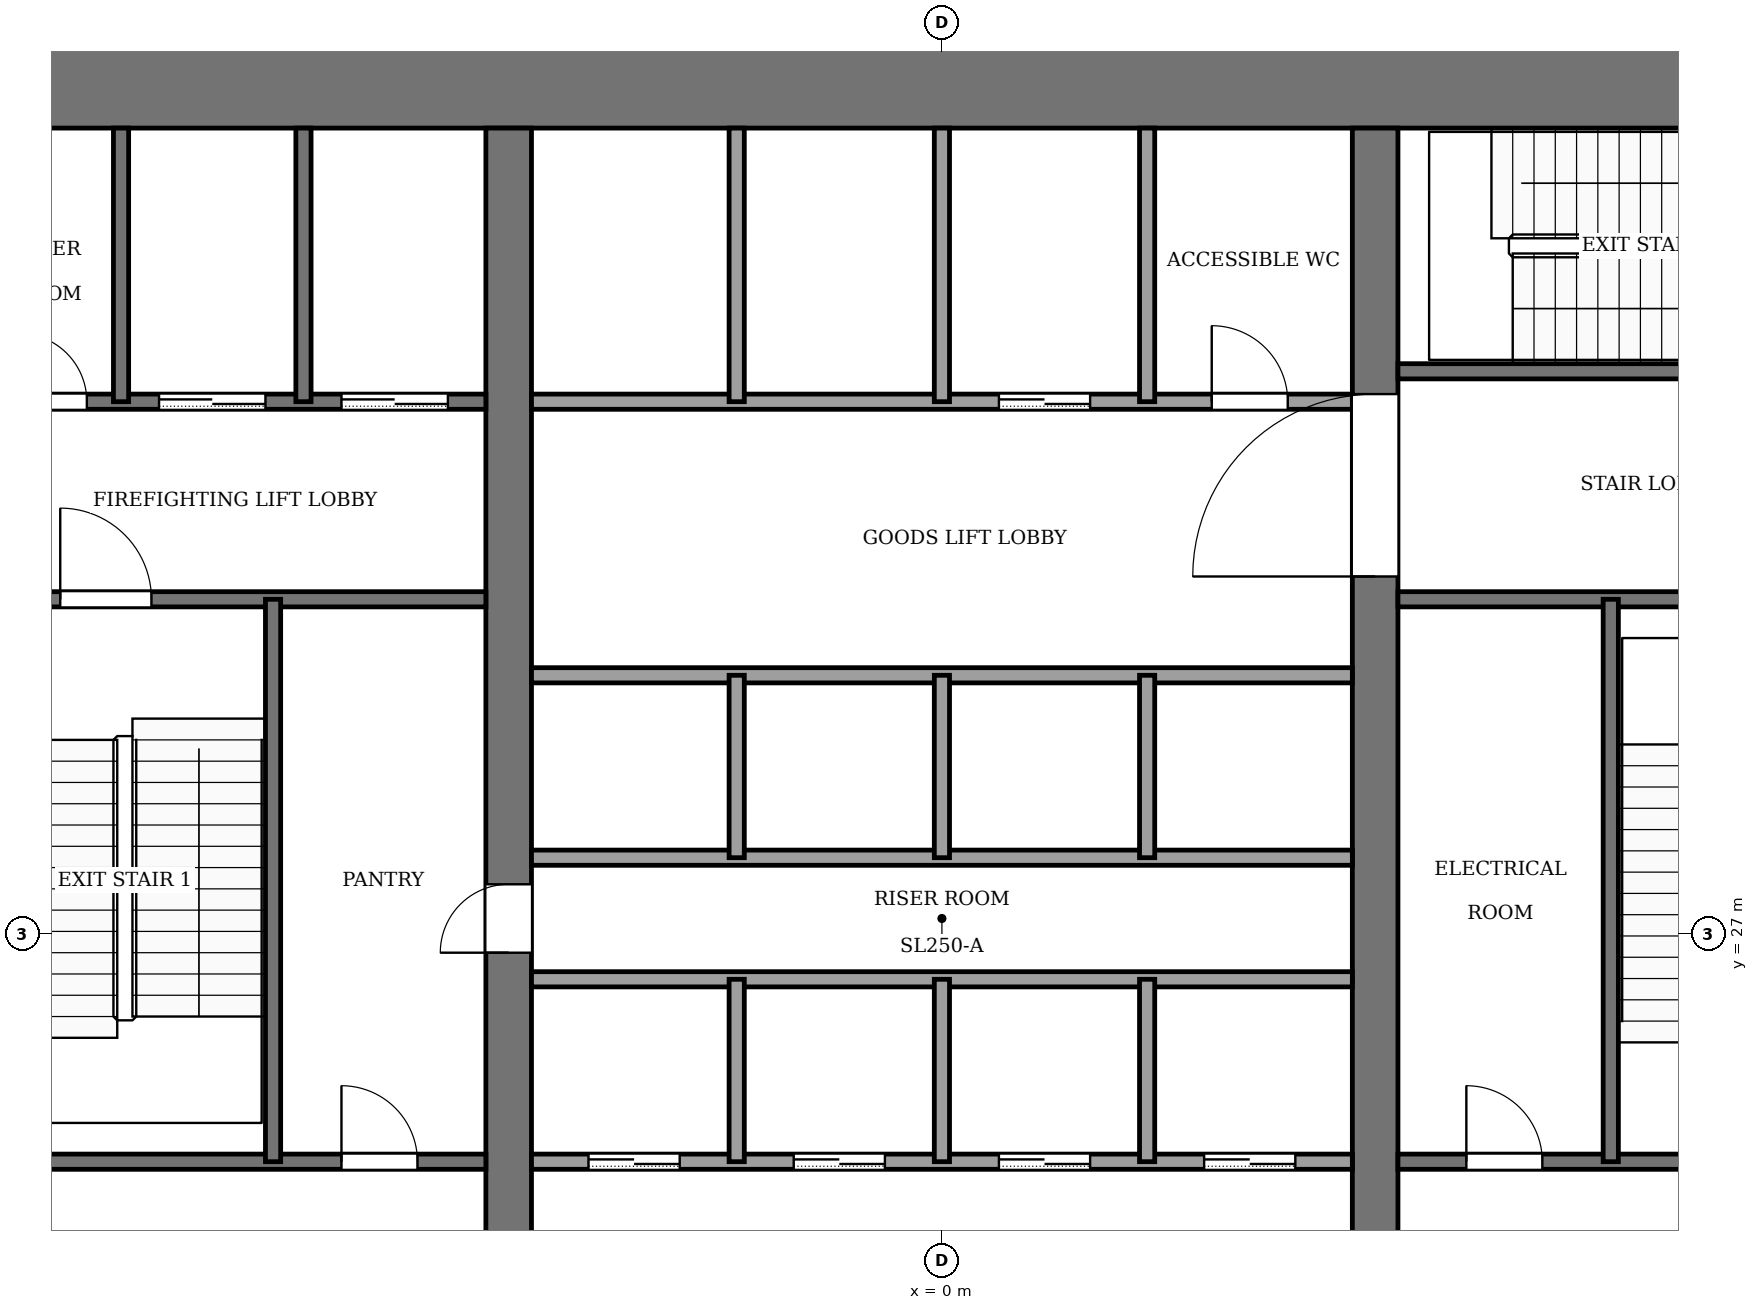
"""IFC4 building model, lengths in metres.
Left out: names, types, materials, properties, quantities, classifications, styles, units other than length and angle.
Written with IfcOpenShell. Run it as: python <this file> out.ifc"""

import sys

from ifc_helpers import new_model, si_unit, direction, frame, frame_2d, origin, place, context, subcontext, project, spatial, rectangle, extrude, element, fill, save


model = new_model("IFC4")
c1 = context("Model", 3, precision=1e-05, world=origin(), true_north=direction((0.0, 1.0)))
c2 = subcontext(c1, "Body", "Model", "MODEL_VIEW")
j1 = project(units=[si_unit("LENGTHUNIT", "METRE"), si_unit("PLANEANGLEUNIT", "RADIAN")], contexts=[c1])
p1 = place(None, origin())
s1 = spatial("IfcSite", under=j1, at=p1, CompositionType="ELEMENT")
p2 = place(p1, origin())
s2 = spatial("IfcBuilding", under=s1, at=p2, CompositionType="ELEMENT")
p3 = place(p2, frame((0.0, 0.0, 9.0)))
s3 = spatial("IfcBuildingStorey", under=s2, at=p3, CompositionType="ELEMENT", Elevation=9.0)
p4 = place(p3, frame((-14.0, 38.3, -0.13), z_axis=(0.0, 0.0, 1.0), x_axis=(1.0, 0.0, 0.0)))
e1 = element("IfcWall", 1, at=p4, inside=s3, PredefinedType="SHEAR", context=c2, shape_type="SweptSolid", body=[
    extrude(rectangle(XDim=28.0, YDim=1.4, at=frame_2d((14.0, 0.0))), origin(), (0.0, 0.0, 1.0), 5.0),
])
p5 = place(p3, frame((-5.7, 18.4, -0.13), z_axis=(0.0, 0.0, 1.0), x_axis=(0.0, 1.0, 0.0)))
e2 = element("IfcWall", 2, at=p5, inside=s3, PredefinedType="SHEAR", context=c2, shape_type="SweptSolid", body=[
    extrude(rectangle(XDim=19.2, YDim=0.6, at=frame_2d((9.6, 0.0))), origin(), (0.0, 0.0, 1.0), 5.0),
])
p6 = place(p5, frame((8.35, 0.0, 0.13)))
e3 = element("IfcOpeningElement", 3, at=p6, cuts=e2, PredefinedType="OPENING", context=c2, shape_type="SweptSolid", body=[
    extrude(rectangle(XDim=0.9, YDim=2.1, at=frame_2d((0.45, 1.05))), frame((0.0, 0.31, 0.0), z_axis=(0.0, -1.0, 0.0), x_axis=(1.0, 0.0, 0.0)), (0.0, 0.0, 1.0), 0.62),
])
p7 = place(p3, frame((5.7, 18.4, -0.13), z_axis=(0.0, 0.0, 1.0), x_axis=(0.0, 1.0, 0.0)))
e4 = element("IfcWall", 4, at=p7, inside=s3, PredefinedType="SHEAR", context=c2, shape_type="SweptSolid", body=[
    extrude(rectangle(XDim=19.2, YDim=0.6, at=frame_2d((9.6, 0.0))), origin(), (0.0, 0.0, 1.0), 5.0),
])
p8 = place(p7, frame((13.3, 0.0, 0.13)))
e5 = element("IfcOpeningElement", 5, at=p8, cuts=e4, PredefinedType="OPENING", context=c2, shape_type="SweptSolid", body=[
    extrude(rectangle(XDim=2.4, YDim=2.4, at=frame_2d((1.2, 1.2))), frame((0.0, 0.31, 0.0), z_axis=(0.0, -1.0, 0.0), x_axis=(1.0, 0.0, 0.0)), (0.0, 0.0, 1.0), 0.62),
])
p9 = place(p3, frame((-12.6, 24.0, 0.0), z_axis=(0.0, 0.0, 1.0), x_axis=(1.0, 0.0, 0.0)))
e6 = element("IfcWall", 6, at=p9, inside=s3, PredefinedType="PARTITIONING", context=c2, shape_type="SweptSolid", body=[
    extrude(rectangle(XDim=6.6, YDim=0.2, at=frame_2d((3.3, 0.0))), origin(), (0.0, 0.0, 1.0), 4.87),
])
p10 = place(p9, frame((4.7, 0.0, 0.0)))
e7 = element("IfcOpeningElement", 7, at=p10, cuts=e6, PredefinedType="OPENING", context=c2, shape_type="SweptSolid", body=[
    extrude(rectangle(XDim=1.0, YDim=2.1, at=frame_2d((0.5, 1.05))), frame((0.0, 0.11, 0.0), z_axis=(0.0, -1.0, 0.0), x_axis=(1.0, 0.0, 0.0)), (0.0, 0.0, 1.0), 0.22),
])
p11 = place(p3, frame((-5.4, 24.0, 0.0), z_axis=(0.0, 0.0, 1.0), x_axis=(1.0, 0.0, 0.0)))
e8 = element("IfcWall", 8, at=p11, inside=s3, PredefinedType="PARTITIONING", context=c2, shape_type="SweptSolid", body=[
    extrude(rectangle(XDim=10.8, YDim=0.2, at=frame_2d((5.4, 0.0))), origin(), (0.0, 0.0, 1.0), 4.87),
])
p12 = place(p11, frame((0.75, 0.0, 0.0)))
e9 = element("IfcOpeningElement", 9, at=p12, cuts=e8, PredefinedType="OPENING", context=c2, shape_type="SweptSolid", body=[
    extrude(rectangle(XDim=1.2, YDim=2.2, at=frame_2d((0.6, 1.1))), frame((0.0, 0.11, 0.0), z_axis=(0.0, -1.0, 0.0), x_axis=(1.0, 0.0, 0.0)), (0.0, 0.0, 1.0), 0.22),
])
p13 = place(p11, frame((3.45, 0.0, 0.0)))
e10 = element("IfcOpeningElement", 10, at=p13, cuts=e8, PredefinedType="OPENING", context=c2, shape_type="SweptSolid", body=[
    extrude(rectangle(XDim=1.2, YDim=2.2, at=frame_2d((0.6, 1.1))), frame((0.0, 0.11, 0.0), z_axis=(0.0, -1.0, 0.0), x_axis=(1.0, 0.0, 0.0)), (0.0, 0.0, 1.0), 0.22),
])
p14 = place(p11, frame((6.15, 0.0, 0.0)))
e11 = element("IfcOpeningElement", 11, at=p14, cuts=e8, PredefinedType="OPENING", context=c2, shape_type="SweptSolid", body=[
    extrude(rectangle(XDim=1.2, YDim=2.2, at=frame_2d((0.6, 1.1))), frame((0.0, 0.11, 0.0), z_axis=(0.0, -1.0, 0.0), x_axis=(1.0, 0.0, 0.0)), (0.0, 0.0, 1.0), 0.22),
])
p15 = place(p11, frame((8.85, 0.0, 0.0)))
e12 = element("IfcOpeningElement", 12, at=p15, cuts=e8, PredefinedType="OPENING", context=c2, shape_type="SweptSolid", body=[
    extrude(rectangle(XDim=1.2, YDim=2.2, at=frame_2d((0.6, 1.1))), frame((0.0, 0.11, 0.0), z_axis=(0.0, -1.0, 0.0), x_axis=(1.0, 0.0, 0.0)), (0.0, 0.0, 1.0), 0.22),
])
p16 = place(p3, frame((6.0, 24.0, 0.0), z_axis=(0.0, 0.0, 1.0), x_axis=(1.0, 0.0, 0.0)))
e13 = element("IfcWall", 13, at=p16, inside=s3, PredefinedType="PARTITIONING", context=c2, shape_type="SweptSolid", body=[
    extrude(rectangle(XDim=6.6, YDim=0.2, at=frame_2d((3.3, 0.0))), origin(), (0.0, 0.0, 1.0), 4.87),
])
p17 = place(p16, frame((0.9, 0.0, 0.0)))
e14 = element("IfcOpeningElement", 14, at=p17, cuts=e13, PredefinedType="OPENING", context=c2, shape_type="SweptSolid", body=[
    extrude(rectangle(XDim=1.0, YDim=2.1, at=frame_2d((0.5, 1.05))), frame((0.0, 0.11, 0.0), z_axis=(0.0, -1.0, 0.0), x_axis=(1.0, 0.0, 0.0)), (0.0, 0.0, 1.0), 0.22),
])
p18 = place(p16, frame((4.4, 0.0, 0.0)))
e15 = element("IfcOpeningElement", 15, at=p18, cuts=e13, PredefinedType="OPENING", context=c2, shape_type="SweptSolid", body=[
    extrude(rectangle(XDim=1.2, YDim=2.2, at=frame_2d((0.6, 1.1))), frame((0.0, 0.11, 0.0), z_axis=(0.0, -1.0, 0.0), x_axis=(1.0, 0.0, 0.0)), (0.0, 0.0, 1.0), 0.22),
])
for number, where, z_axis, x_axis in (
    (16, (-5.4, 26.4, 0.0), (0.0, 0.0, 1.0), (1.0, 0.0, 0.0)),
    (17, (-5.4, 28.0, 0.0), (0.0, 0.0, 1.0), (1.0, 0.0, 0.0)),
    (18, (-5.4, 30.4, 0.0), (0.0, 0.0, 1.0), (1.0, 0.0, 0.0)),
):
    element("IfcWall", number, at=place(p3, frame(where, z_axis=z_axis, x_axis=x_axis)), inside=s3, PredefinedType="PARTITIONING", context=c2, shape_type="SweptSolid", body=[
        extrude(rectangle(XDim=10.8, YDim=0.2, at=frame_2d((5.4, 0.0))), origin(), (0.0, 0.0, 1.0), 4.87),
    ])
p19 = place(p3, frame((-12.6, 31.4, 0.0), z_axis=(0.0, 0.0, 1.0), x_axis=(1.0, 0.0, 0.0)))
e19 = element("IfcWall", 19, at=p19, inside=s3, PredefinedType="PARTITIONING", context=c2, shape_type="SweptSolid", body=[
    extrude(rectangle(XDim=6.6, YDim=0.2, at=frame_2d((3.3, 0.0))), origin(), (0.0, 0.0, 1.0), 4.87),
])
p20 = place(p19, frame((1.0, 0.0, 0.0)))
e20 = element("IfcOpeningElement", 20, at=p20, cuts=e19, PredefinedType="OPENING", context=c2, shape_type="SweptSolid", body=[
    extrude(rectangle(XDim=1.2, YDim=2.2, at=frame_2d((0.6, 1.1))), frame((0.0, 0.11, 0.0), z_axis=(0.0, -1.0, 0.0), x_axis=(1.0, 0.0, 0.0)), (0.0, 0.0, 1.0), 0.22),
])
p21 = place(p3, frame((6.0, 31.4, 0.0), z_axis=(0.0, 0.0, 1.0), x_axis=(1.0, 0.0, 0.0)))
e21 = element("IfcWall", 21, at=p21, inside=s3, PredefinedType="PARTITIONING", context=c2, shape_type="SweptSolid", body=[
    extrude(rectangle(XDim=6.6, YDim=0.2, at=frame_2d((3.3, 0.0))), origin(), (0.0, 0.0, 1.0), 4.87),
])
p22 = place(p3, frame((-12.6, 34.0, 0.0), z_axis=(0.0, 0.0, 1.0), x_axis=(1.0, 0.0, 0.0)))
e22 = element("IfcWall", 22, at=p22, inside=s3, PredefinedType="PARTITIONING", context=c2, shape_type="SweptSolid", body=[
    extrude(rectangle(XDim=6.6, YDim=0.2, at=frame_2d((3.3, 0.0))), origin(), (0.0, 0.0, 1.0), 4.87),
])
p23 = place(p22, frame((4.7, 0.0, 0.0)))
e23 = element("IfcOpeningElement", 23, at=p23, cuts=e22, PredefinedType="OPENING", context=c2, shape_type="SweptSolid", body=[
    extrude(rectangle(XDim=1.4, YDim=2.2, at=frame_2d((0.7, 1.1))), frame((0.0, 0.11, 0.0), z_axis=(0.0, -1.0, 0.0), x_axis=(1.0, 0.0, 0.0)), (0.0, 0.0, 1.0), 0.22),
])
p24 = place(p22, frame((2.3, 0.0, 0.0)))
e24 = element("IfcOpeningElement", 24, at=p24, cuts=e22, PredefinedType="OPENING", context=c2, shape_type="SweptSolid", body=[
    extrude(rectangle(XDim=1.4, YDim=2.2, at=frame_2d((0.7, 1.1))), frame((0.0, 0.11, 0.0), z_axis=(0.0, -1.0, 0.0), x_axis=(1.0, 0.0, 0.0)), (0.0, 0.0, 1.0), 0.22),
])
p25 = place(p22, frame((0.45, 0.0, 0.0)))
e25 = element("IfcOpeningElement", 25, at=p25, cuts=e22, PredefinedType="OPENING", context=c2, shape_type="SweptSolid", body=[
    extrude(rectangle(XDim=0.9, YDim=2.1, at=frame_2d((0.45, 1.05))), frame((0.0, 0.11, 0.0), z_axis=(0.0, -1.0, 0.0), x_axis=(1.0, 0.0, 0.0)), (0.0, 0.0, 1.0), 0.22),
])
p26 = place(p3, frame((-5.4, 34.0, 0.0), z_axis=(0.0, 0.0, 1.0), x_axis=(1.0, 0.0, 0.0)))
e26 = element("IfcWall", 26, at=p26, inside=s3, PredefinedType="PARTITIONING", context=c2, shape_type="SweptSolid", body=[
    extrude(rectangle(XDim=10.8, YDim=0.2, at=frame_2d((5.4, 0.0))), origin(), (0.0, 0.0, 1.0), 4.87),
])
p27 = place(p26, frame((6.15, 0.0, 0.0)))
e27 = element("IfcOpeningElement", 27, at=p27, cuts=e26, PredefinedType="OPENING", context=c2, shape_type="SweptSolid", body=[
    extrude(rectangle(XDim=1.2, YDim=2.2, at=frame_2d((0.6, 1.1))), frame((0.0, 0.11, 0.0), z_axis=(0.0, -1.0, 0.0), x_axis=(1.0, 0.0, 0.0)), (0.0, 0.0, 1.0), 0.22),
])
p28 = place(p26, frame((8.95, 0.0, 0.0)))
e28 = element("IfcOpeningElement", 28, at=p28, cuts=e26, PredefinedType="OPENING", context=c2, shape_type="SweptSolid", body=[
    extrude(rectangle(XDim=1.0, YDim=2.1, at=frame_2d((0.5, 1.05))), frame((0.0, 0.11, 0.0), z_axis=(0.0, -1.0, 0.0), x_axis=(1.0, 0.0, 0.0)), (0.0, 0.0, 1.0), 0.22),
])
p29 = place(p3, frame((6.0, 34.4, 0.0), z_axis=(0.0, 0.0, 1.0), x_axis=(1.0, 0.0, 0.0)))
e29 = element("IfcWall", 29, at=p29, inside=s3, PredefinedType="PARTITIONING", context=c2, shape_type="SweptSolid", body=[
    extrude(rectangle(XDim=6.6, YDim=0.2, at=frame_2d((3.3, 0.0))), origin(), (0.0, 0.0, 1.0), 4.87),
])
p30 = place(p29, frame((4.8, 0.0, 0.0)))
e30 = element("IfcOpeningElement", 30, at=p30, cuts=e29, PredefinedType="OPENING", context=c2, shape_type="SweptSolid", body=[
    extrude(rectangle(XDim=1.2, YDim=2.2, at=frame_2d((0.6, 1.1))), frame((0.0, 0.11, 0.0), z_axis=(0.0, -1.0, 0.0), x_axis=(1.0, 0.0, 0.0)), (0.0, 0.0, 1.0), 0.22),
])
p31 = place(p3, frame((-10.8, 34.0, 0.0), z_axis=(0.0, 0.0, 1.0), x_axis=(0.0, 1.0, 0.0)))
e31 = element("IfcWall", 31, at=p31, inside=s3, PredefinedType="PARTITIONING", context=c2, shape_type="SweptSolid", body=[
    extrude(rectangle(XDim=3.6, YDim=0.2, at=frame_2d((1.8, 0.0))), origin(), (0.0, 0.0, 1.0), 4.87),
])
p32 = place(p3, frame((-8.8, 24.0, 0.0), z_axis=(0.0, 0.0, 1.0), x_axis=(0.0, 1.0, 0.0)))
e32 = element("IfcWall", 32, at=p32, inside=s3, PredefinedType="PARTITIONING", context=c2, shape_type="SweptSolid", body=[
    extrude(rectangle(XDim=7.4, YDim=0.2, at=frame_2d((3.7, 0.0))), origin(), (0.0, 0.0, 1.0), 4.87),
])
p33 = place(p3, frame((-8.4, 34.0, 0.0), z_axis=(0.0, 0.0, 1.0), x_axis=(0.0, 1.0, 0.0)))
e33 = element("IfcWall", 33, at=p33, inside=s3, PredefinedType="PARTITIONING", context=c2, shape_type="SweptSolid", body=[
    extrude(rectangle(XDim=3.6, YDim=0.2, at=frame_2d((1.8, 0.0))), origin(), (0.0, 0.0, 1.0), 4.87),
])
for number, where, z_axis, x_axis in (
    (34, (-2.7, 24.0, 0.0), (0.0, 0.0, 1.0), (0.0, 1.0, 0.0)),
    (35, (-2.7, 28.0, 0.0), (0.0, 0.0, 1.0), (0.0, 1.0, 0.0)),
):
    element("IfcWall", number, at=place(p3, frame(where, z_axis=z_axis, x_axis=x_axis)), inside=s3, PredefinedType="PARTITIONING", context=c2, shape_type="SweptSolid", body=[
        extrude(rectangle(XDim=2.4, YDim=0.2, at=frame_2d((1.2, 0.0))), origin(), (0.0, 0.0, 1.0), 4.87),
    ])
p34 = place(p3, frame((-2.7, 34.0, 0.0), z_axis=(0.0, 0.0, 1.0), x_axis=(0.0, 1.0, 0.0)))
e36 = element("IfcWall", 36, at=p34, inside=s3, PredefinedType="PARTITIONING", context=c2, shape_type="SweptSolid", body=[
    extrude(rectangle(XDim=3.6, YDim=0.2, at=frame_2d((1.8, 0.0))), origin(), (0.0, 0.0, 1.0), 4.87),
])
for number, where, z_axis, x_axis in (
    (37, (0.0, 24.0, 0.0), (0.0, 0.0, 1.0), (0.0, 1.0, 0.0)),
    (38, (0.0, 28.0, 0.0), (0.0, 0.0, 1.0), (0.0, 1.0, 0.0)),
):
    element("IfcWall", number, at=place(p3, frame(where, z_axis=z_axis, x_axis=x_axis)), inside=s3, PredefinedType="PARTITIONING", context=c2, shape_type="SweptSolid", body=[
        extrude(rectangle(XDim=2.4, YDim=0.2, at=frame_2d((1.2, 0.0))), origin(), (0.0, 0.0, 1.0), 4.87),
    ])
p35 = place(p3, frame((0.0, 34.0, 0.0), z_axis=(0.0, 0.0, 1.0), x_axis=(0.0, 1.0, 0.0)))
e39 = element("IfcWall", 39, at=p35, inside=s3, PredefinedType="PARTITIONING", context=c2, shape_type="SweptSolid", body=[
    extrude(rectangle(XDim=3.6, YDim=0.2, at=frame_2d((1.8, 0.0))), origin(), (0.0, 0.0, 1.0), 4.87),
])
for number, where, z_axis, x_axis in (
    (40, (2.7, 24.0, 0.0), (0.0, 0.0, 1.0), (0.0, 1.0, 0.0)),
    (41, (2.7, 28.0, 0.0), (0.0, 0.0, 1.0), (0.0, 1.0, 0.0)),
):
    element("IfcWall", number, at=place(p3, frame(where, z_axis=z_axis, x_axis=x_axis)), inside=s3, PredefinedType="PARTITIONING", context=c2, shape_type="SweptSolid", body=[
        extrude(rectangle(XDim=2.4, YDim=0.2, at=frame_2d((1.2, 0.0))), origin(), (0.0, 0.0, 1.0), 4.87),
    ])
p36 = place(p3, frame((2.7, 34.0, 0.0), z_axis=(0.0, 0.0, 1.0), x_axis=(0.0, 1.0, 0.0)))
e42 = element("IfcWall", 42, at=p36, inside=s3, PredefinedType="PARTITIONING", context=c2, shape_type="SweptSolid", body=[
    extrude(rectangle(XDim=3.6, YDim=0.2, at=frame_2d((1.8, 0.0))), origin(), (0.0, 0.0, 1.0), 4.87),
])
p37 = place(p3, frame((8.8, 24.0, 0.0), z_axis=(0.0, 0.0, 1.0), x_axis=(0.0, 1.0, 0.0)))
e43 = element("IfcWall", 43, at=p37, inside=s3, PredefinedType="PARTITIONING", context=c2, shape_type="SweptSolid", body=[
    extrude(rectangle(XDim=7.4, YDim=0.2, at=frame_2d((3.7, 0.0))), origin(), (0.0, 0.0, 1.0), 4.87),
])
p38 = place(p12, origin())
e44 = element("IfcDoor", 44, at=p38, inside=s3, OperationType="SLIDING_TO_LEFT", PredefinedType="DOOR", context=c2, shape_type="SweptSolid", body=[
    extrude(rectangle(XDim=1.2, YDim=2.2, at=frame_2d((0.6, 1.1))), frame((0.0, 0.025, 0.0), z_axis=(0.0, -1.0, 0.0), x_axis=(1.0, 0.0, 0.0)), (0.0, 0.0, 1.0), 0.05),
])
fill(e9, e44)
p39 = place(p13, origin())
e45 = element("IfcDoor", 45, at=p39, inside=s3, OperationType="SLIDING_TO_LEFT", PredefinedType="DOOR", context=c2, shape_type="SweptSolid", body=[
    extrude(rectangle(XDim=1.2, YDim=2.2, at=frame_2d((0.6, 1.1))), frame((0.0, 0.025, 0.0), z_axis=(0.0, -1.0, 0.0), x_axis=(1.0, 0.0, 0.0)), (0.0, 0.0, 1.0), 0.05),
])
fill(e10, e45)
p40 = place(p14, origin())
e46 = element("IfcDoor", 46, at=p40, inside=s3, OperationType="SLIDING_TO_LEFT", PredefinedType="DOOR", context=c2, shape_type="SweptSolid", body=[
    extrude(rectangle(XDim=1.2, YDim=2.2, at=frame_2d((0.6, 1.1))), frame((0.0, 0.025, 0.0), z_axis=(0.0, -1.0, 0.0), x_axis=(1.0, 0.0, 0.0)), (0.0, 0.0, 1.0), 0.05),
])
fill(e11, e46)
p41 = place(p15, origin())
e47 = element("IfcDoor", 47, at=p41, inside=s3, OperationType="SLIDING_TO_LEFT", PredefinedType="DOOR", context=c2, shape_type="SweptSolid", body=[
    extrude(rectangle(XDim=1.2, YDim=2.2, at=frame_2d((0.6, 1.1))), frame((0.0, 0.025, 0.0), z_axis=(0.0, -1.0, 0.0), x_axis=(1.0, 0.0, 0.0)), (0.0, 0.0, 1.0), 0.05),
])
fill(e12, e47)
p42 = place(p27, origin())
e48 = element("IfcDoor", 48, at=p42, inside=s3, OperationType="SLIDING_TO_LEFT", PredefinedType="DOOR", context=c2, shape_type="SweptSolid", body=[
    extrude(rectangle(XDim=1.2, YDim=2.2, at=frame_2d((0.6, 1.1))), frame((0.0, 0.025, 0.0), z_axis=(0.0, -1.0, 0.0), x_axis=(1.0, 0.0, 0.0)), (0.0, 0.0, 1.0), 0.05),
])
fill(e27, e48)
p43 = place(p23, origin())
e49 = element("IfcDoor", 49, at=p43, inside=s3, OperationType="SLIDING_TO_LEFT", PredefinedType="DOOR", context=c2, shape_type="SweptSolid", body=[
    extrude(rectangle(XDim=1.4, YDim=2.2, at=frame_2d((0.7, 1.1))), frame((0.0, 0.025, 0.0), z_axis=(0.0, -1.0, 0.0), x_axis=(1.0, 0.0, 0.0)), (0.0, 0.0, 1.0), 0.05),
])
fill(e23, e49)
p44 = place(p24, origin())
e50 = element("IfcDoor", 50, at=p44, inside=s3, OperationType="SLIDING_TO_LEFT", PredefinedType="DOOR", context=c2, shape_type="SweptSolid", body=[
    extrude(rectangle(XDim=1.4, YDim=2.2, at=frame_2d((0.7, 1.1))), frame((0.0, 0.025, 0.0), z_axis=(0.0, -1.0, 0.0), x_axis=(1.0, 0.0, 0.0)), (0.0, 0.0, 1.0), 0.05),
])
fill(e24, e50)
p45 = place(p25, origin())
e51 = element("IfcDoor", 51, at=p45, inside=s3, OperationType="SINGLE_SWING_RIGHT", PredefinedType="DOOR", context=c2, shape_type="SweptSolid", body=[
    extrude(rectangle(XDim=0.9, YDim=2.1, at=frame_2d((0.45, 1.05))), frame((0.0, 0.025, 0.0), z_axis=(0.0, -1.0, 0.0), x_axis=(1.0, 0.0, 0.0)), (0.0, 0.0, 1.0), 0.05),
])
fill(e25, e51)
p46 = place(p10, origin())
e52 = element("IfcDoor", 52, at=p46, inside=s3, OperationType="SINGLE_SWING_RIGHT", PredefinedType="DOOR", context=c2, shape_type="SweptSolid", body=[
    extrude(rectangle(XDim=1.0, YDim=2.1, at=frame_2d((0.5, 1.05))), frame((0.0, 0.025, 0.0), z_axis=(0.0, -1.0, 0.0), x_axis=(1.0, 0.0, 0.0)), (0.0, 0.0, 1.0), 0.05),
])
fill(e7, e52)
p47 = place(p17, origin())
e53 = element("IfcDoor", 53, at=p47, inside=s3, OperationType="SINGLE_SWING_LEFT", PredefinedType="DOOR", context=c2, shape_type="SweptSolid", body=[
    extrude(rectangle(XDim=1.0, YDim=2.1, at=frame_2d((0.5, 1.05))), frame((0.0, 0.025, 0.0), z_axis=(0.0, -1.0, 0.0), x_axis=(1.0, 0.0, 0.0)), (0.0, 0.0, 1.0), 0.05),
])
fill(e14, e53)
p48 = place(p28, origin())
e54 = element("IfcDoor", 54, at=p48, inside=s3, OperationType="SINGLE_SWING_LEFT", PredefinedType="DOOR", context=c2, shape_type="SweptSolid", body=[
    extrude(rectangle(XDim=1.0, YDim=2.1, at=frame_2d((0.5, 1.05))), frame((0.0, 0.025, 0.0), z_axis=(0.0, -1.0, 0.0), x_axis=(1.0, 0.0, 0.0)), (0.0, 0.0, 1.0), 0.05),
])
fill(e28, e54)
p49 = place(p6, origin())
e55 = element("IfcDoor", 55, at=p49, inside=s3, OperationType="SINGLE_SWING_RIGHT", PredefinedType="DOOR", context=c2, shape_type="SweptSolid", body=[
    extrude(rectangle(XDim=0.9, YDim=2.1, at=frame_2d((0.45, 1.05))), frame((0.0, 0.025, 0.0), z_axis=(0.0, -1.0, 0.0), x_axis=(1.0, 0.0, 0.0)), (0.0, 0.0, 1.0), 0.05),
])
fill(e3, e55)
p50 = place(p20, origin())
e56 = element("IfcDoor", 56, at=p50, inside=s3, OperationType="SINGLE_SWING_RIGHT", PredefinedType="DOOR", context=c2, shape_type="SweptSolid", body=[
    extrude(rectangle(XDim=1.2, YDim=2.2, at=frame_2d((0.6, 1.1))), frame((0.0, 0.025, 0.0), z_axis=(0.0, -1.0, 0.0), x_axis=(1.0, 0.0, 0.0)), (0.0, 0.0, 1.0), 0.05),
])
fill(e20, e56)
p51 = place(p8, origin())
e57 = element("IfcDoor", 57, at=p51, inside=s3, OperationType="DOUBLE_DOOR_SINGLE_SWING", PredefinedType="DOOR", context=c2, shape_type="SweptSolid", body=[
    extrude(rectangle(XDim=2.4, YDim=2.4, at=frame_2d((1.2, 1.2))), frame((0.0, 0.025, 0.0), z_axis=(0.0, -1.0, 0.0), x_axis=(1.0, 0.0, 0.0)), (0.0, 0.0, 1.0), 0.05),
])
fill(e5, e57)
save(model, sys.argv[1])
